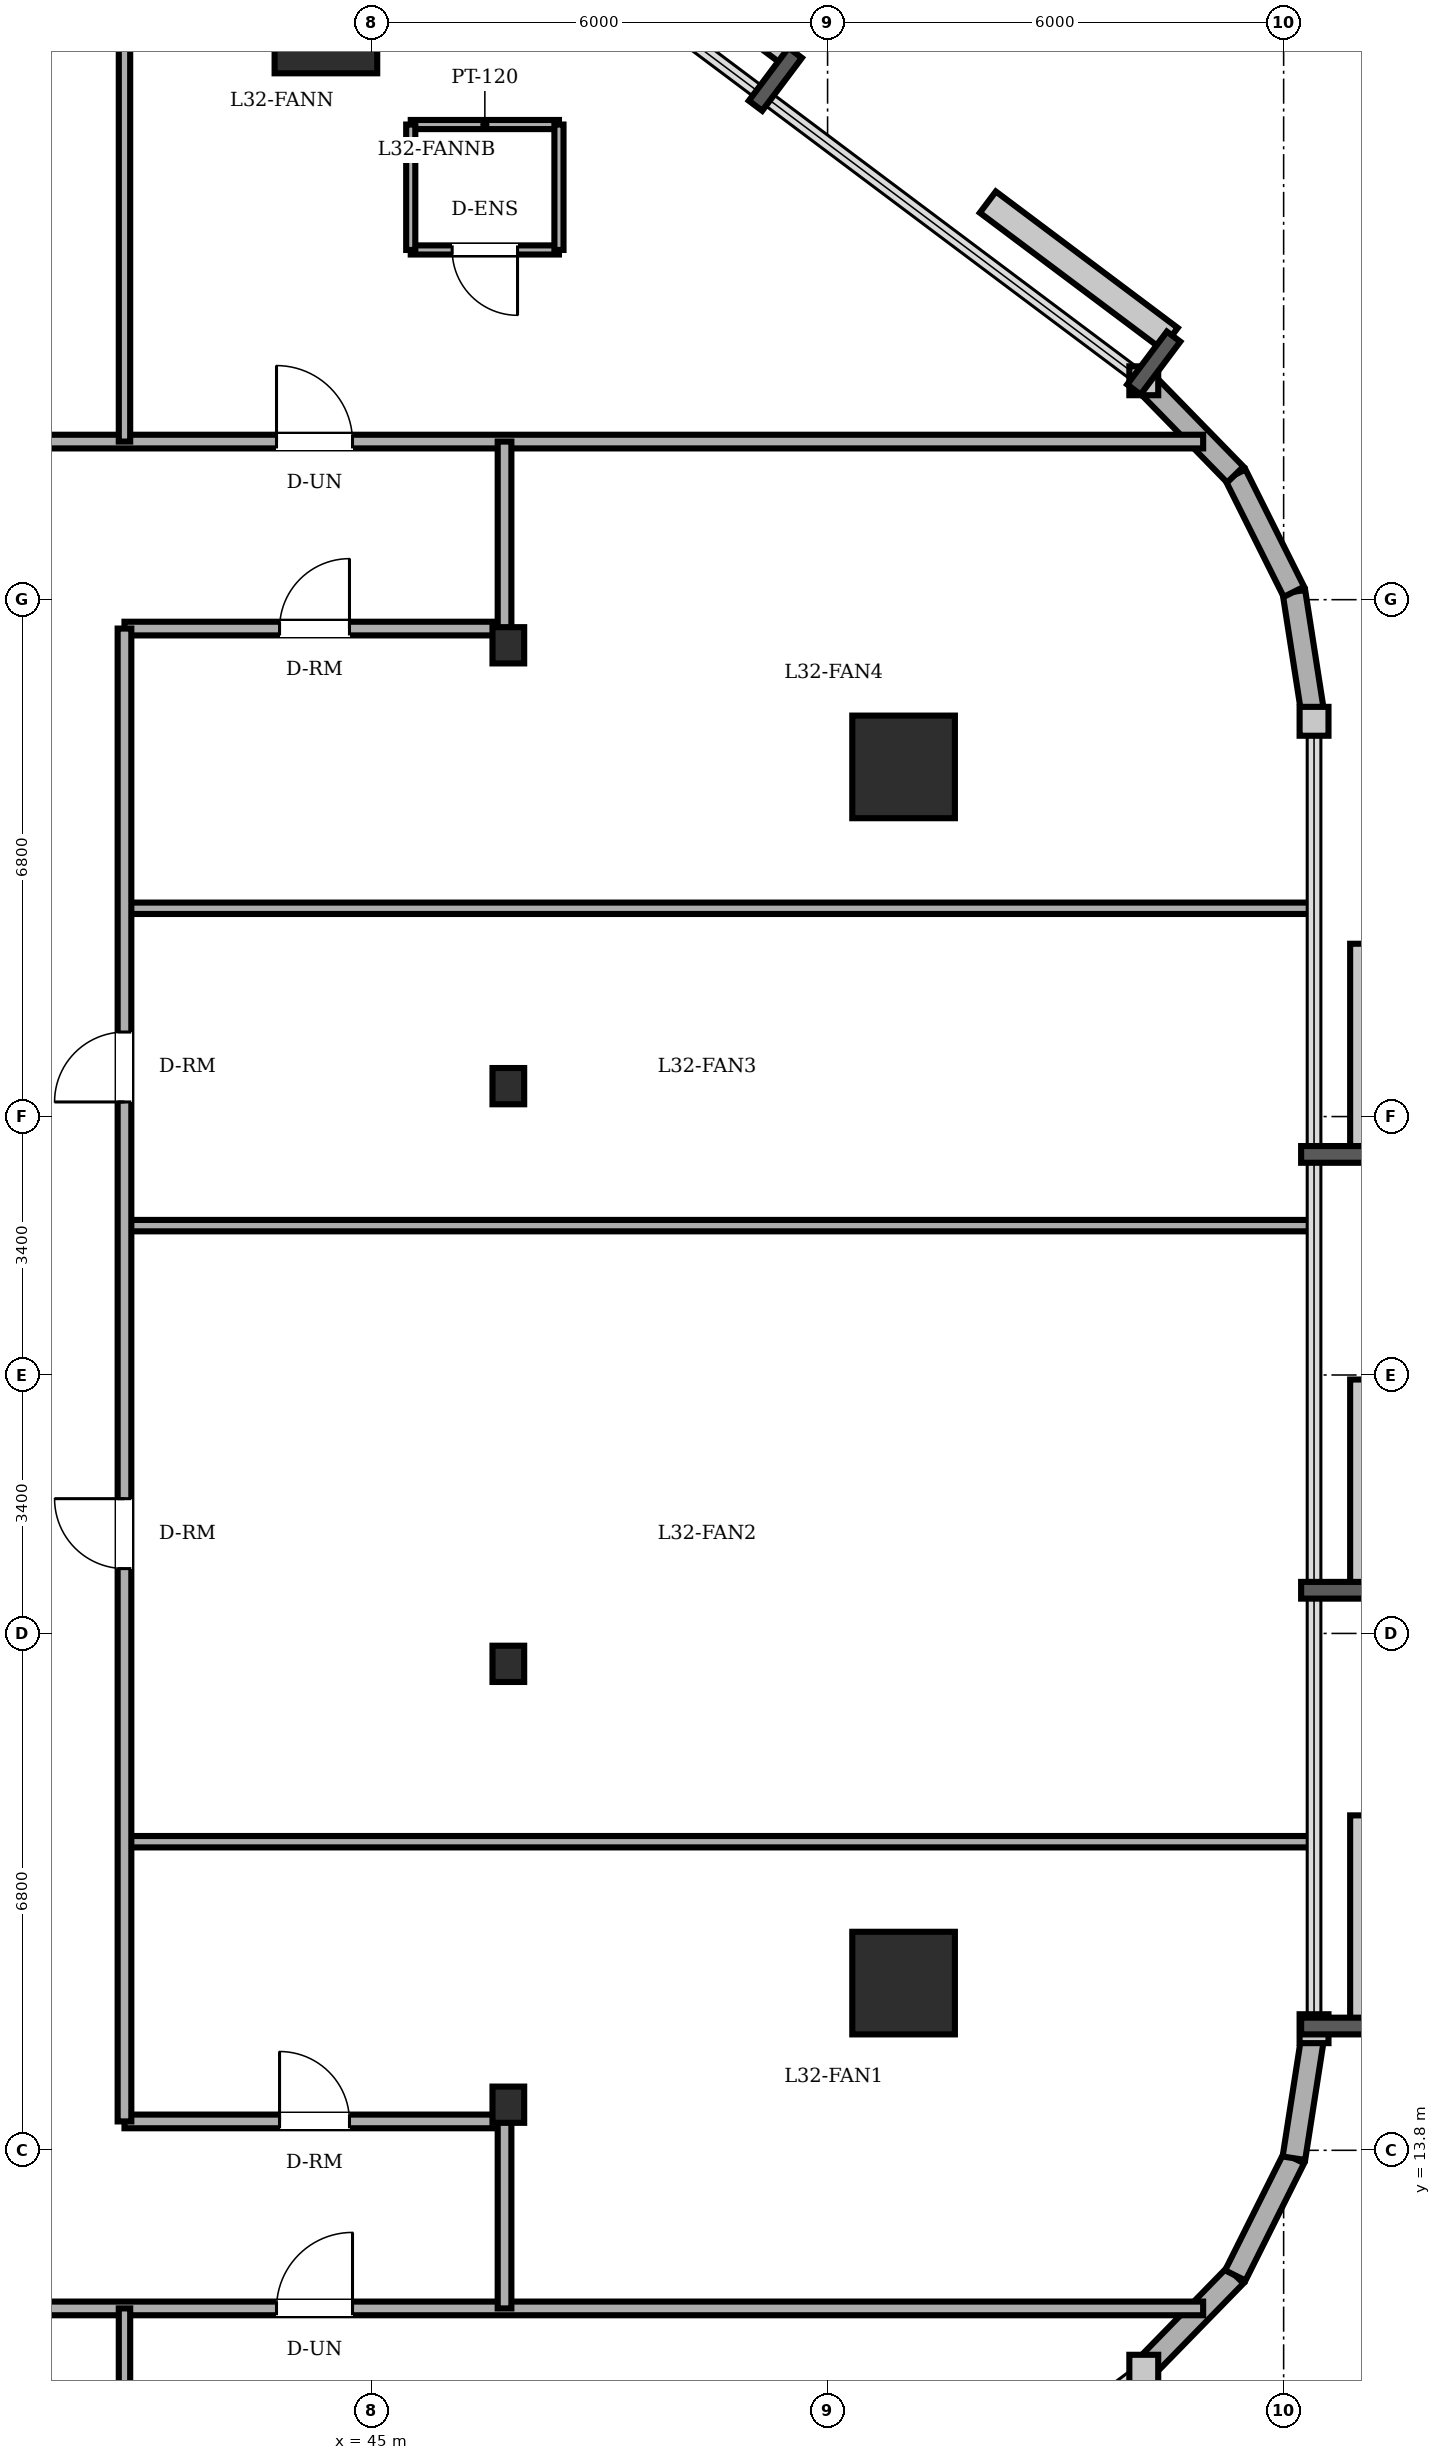
"""IFC4 building model, lengths in metres.
Left out: names, types, materials, properties, quantities, classifications, styles, units other than length and angle.
Written with IfcOpenShell. Run it as: python <this file> out.ifc"""

import sys

from ifc_helpers import new_model, si_unit, direction, frame, frame_2d, origin, origin_2d, place, context, subcontext, project, spatial, rectangle, circle, i_section, extrude, element, fill, save


model = new_model("IFC4")
c1 = context("Model", 3, precision=1e-05, world=origin(), true_north=direction((0.0, 1.0)))
c2 = subcontext(c1, "Body", "Model", "MODEL_VIEW")
j1 = project(units=[si_unit("LENGTHUNIT", "METRE"), si_unit("PLANEANGLEUNIT", "RADIAN")], contexts=[c1])
p1 = place(None, origin())
s1 = spatial("IfcSite", under=j1, at=p1, CompositionType="ELEMENT")
p2 = place(p1, origin())
s2 = spatial("IfcBuilding", under=s1, at=p2, CompositionType="ELEMENT")
p3 = place(p2, frame((0.0, 0.0, 122.3)))
s3 = spatial("IfcBuildingStorey", under=s2, at=p3, CompositionType="ELEMENT", Elevation=122.3)
for number, where, z_axis, x_axis in (
    (1, (52.0, 16.0, 0.0), (0.0, 0.0, 1.0), (1.0, 0.0, 0.0)),
    (2, (52.0, 32.0, 0.0), (0.0, 0.0, 1.0), (1.0, 0.0, 0.0)),
    (3, (44.4, 41.8, 0.0), (0.0, 0.0, 1.0), (1.0, 0.0, 0.0)),
):
    element("IfcColumn", number, at=place(p3, frame(where, z_axis=z_axis, x_axis=x_axis)), inside=s3, PredefinedType="COLUMN", context=c2, shape_type="SweptSolid", body=[
        extrude(circle(Radius=0.675, at=origin_2d()), origin(), (0.0, 0.0, 1.0), 3.6),
    ])
for number, where, z_axis, x_axis in (
    (4, (46.8, 14.4, 0.0), (0.0, 0.0, 1.0), (1.0, 0.0, 0.0)),
    (5, (46.8, 20.2, 0.0), (0.0, 0.0, 1.0), (1.0, 0.0, 0.0)),
    (6, (46.8, 27.8, 0.0), (0.0, 0.0, 1.0), (1.0, 0.0, 0.0)),
    (7, (46.8, 33.6, 0.0), (0.0, 0.0, 1.0), (1.0, 0.0, 0.0)),
):
    element("IfcColumn", number, at=place(p3, frame(where, z_axis=z_axis, x_axis=x_axis)), inside=s3, PredefinedType="COLUMN", context=c2, shape_type="SweptSolid", body=[
        extrude(i_section(OverallWidth=0.417, OverallDepth=0.477, WebThickness=0.036, FlangeThickness=0.057, FilletRadius=0.015, at=origin_2d()), origin(), (0.0, 0.0, 1.0), 3.6),
    ])
for number, where, z_axis, x_axis in (
    (8, (55.16, 10.92, 0.0), (0.0, 0.0, 1.0), (0.698, 0.716, 0.0)),
    (9, (56.364, 12.154, 0.0), (0.0, 0.0, 1.0), (0.447, 0.894, 0.0)),
):
    element("IfcWall", number, at=place(p3, frame(where, z_axis=z_axis, x_axis=x_axis)), inside=s3, PredefinedType="SOLIDWALL", context=c2, shape_type="SweptSolid", body=[
        extrude(rectangle(XDim=1.724, YDim=0.3, at=frame_2d((0.862, 0.0))), origin(), (0.0, 0.0, 1.0), 3.4),
    ])
for number, where, z_axis, x_axis in (
    (10, (57.135, 13.696, 0.0), (0.0, 0.0, 1.0), (0.154, 0.988, 0.0)),
    (11, (57.4, 32.6, 0.0), (0.0, 0.0, 1.0), (-0.154, 0.988, 0.0)),
):
    element("IfcWall", number, at=place(p3, frame(where, z_axis=z_axis, x_axis=x_axis)), inside=s3, PredefinedType="SOLIDWALL", context=c2, shape_type="SweptSolid", body=[
        extrude(rectangle(XDim=1.724, YDim=0.3, at=frame_2d((0.862, 0.0))), origin(), (0.0, 0.0, 1.0), 3.4),
    ])
for number, where, z_axis, x_axis in (
    (12, (57.135, 34.304, 0.0), (0.0, 0.0, 1.0), (-0.447, 0.894, 0.0)),
    (13, (56.364, 35.846, 0.0), (0.0, 0.0, 1.0), (-0.698, 0.716, 0.0)),
):
    element("IfcWall", number, at=place(p3, frame(where, z_axis=z_axis, x_axis=x_axis)), inside=s3, PredefinedType="SOLIDWALL", context=c2, shape_type="SweptSolid", body=[
        extrude(rectangle(XDim=1.724, YDim=0.3, at=frame_2d((0.862, 0.0))), origin(), (0.0, 0.0, 1.0), 3.4),
    ])
p4 = place(p3, frame((45.516, 40.451, 0.0), z_axis=(0.0, 0.0, 1.0), x_axis=(1.0, 0.0, 0.0)))
e14 = element("IfcWall", 14, at=p4, inside=s3, PredefinedType="PARTITIONING", context=c2, shape_type="SweptSolid", body=[
    extrude(rectangle(XDim=1.95, YDim=0.12, at=frame_2d((0.975, 0.0))), origin(), (0.0, 0.0, 1.0), 3.4),
])
p5 = place(p3, frame((47.466, 38.801, 0.0), z_axis=(0.0, 0.0, 1.0), x_axis=(-1.0, 0.0, 0.0)))
e15 = element("IfcWall", 15, at=p5, inside=s3, PredefinedType="PARTITIONING", context=c2, shape_type="SweptSolid", body=[
    extrude(rectangle(XDim=1.95, YDim=0.12, at=frame_2d((0.975, 0.0))), origin(), (0.0, 0.0, 1.0), 3.4),
])
p6 = place(p5, frame((0.545, 0.0, 0.0)))
e16 = element("IfcOpeningElement", 16, at=p6, cuts=e15, PredefinedType="OPENING", context=c2, shape_type="SweptSolid", body=[
    extrude(rectangle(XDim=0.86, YDim=2.1, at=frame_2d((0.43, 1.05))), frame((0.0, 0.07, 0.0), z_axis=(0.0, -1.0, 0.0), x_axis=(1.0, 0.0, 0.0)), (0.0, 0.0, 1.0), 0.14),
])
for number, where, z_axis, x_axis in (
    (17, (45.516, 40.451, 0.0), (0.0, 0.0, 1.0), (0.0, -1.0, 0.0)),
    (18, (47.466, 38.801, 0.0), (0.0, 0.0, 1.0), (0.0, 1.0, 0.0)),
):
    element("IfcWall", number, at=place(p3, frame(where, z_axis=z_axis, x_axis=x_axis)), inside=s3, PredefinedType="PARTITIONING", context=c2, shape_type="SweptSolid", body=[
        extrude(rectangle(XDim=1.65, YDim=0.12, at=frame_2d((0.825, 0.0))), origin(), (0.0, 0.0, 1.0), 3.4),
    ])
p7 = place(p3, frame((8.8, 11.72, 0.0), z_axis=(0.0, 0.0, 1.0), x_axis=(1.0, 0.0, 0.0)))
e19 = element("IfcWall", 19, at=p7, inside=s3, PredefinedType="PARTITIONING", context=c2, shape_type="SweptSolid", body=[
    extrude(rectangle(XDim=47.141, YDim=0.18, at=frame_2d((23.57, 0.0))), origin(), (0.0, 0.0, 1.0), 3.4),
])
p8 = place(p7, frame((17.24, 0.0, 0.0)))
e20 = element("IfcOpeningElement", 20, at=p8, cuts=e19, PredefinedType="OPENING", context=c2, shape_type="SweptSolid", body=[
    extrude(rectangle(XDim=0.92, YDim=2.1, at=frame_2d((0.46, 1.05))), frame((0.0, 0.1, 0.0), z_axis=(0.0, -1.0, 0.0), x_axis=(1.0, 0.0, 0.0)), (0.0, 0.0, 1.0), 0.2),
])
p9 = place(p7, frame((34.95, 0.0, 0.0)))
e21 = element("IfcOpeningElement", 21, at=p9, cuts=e19, PredefinedType="OPENING", context=c2, shape_type="SweptSolid", body=[
    extrude(rectangle(XDim=1.0, YDim=2.15, at=frame_2d((0.5, 1.075))), frame((0.0, 0.1, 0.0), z_axis=(0.0, -1.0, 0.0), x_axis=(1.0, 0.0, 0.0)), (0.0, 0.0, 1.0), 0.2),
])
p10 = place(p7, frame((8.04, 0.0, 0.0)))
e22 = element("IfcOpeningElement", 22, at=p10, cuts=e19, PredefinedType="OPENING", context=c2, shape_type="SweptSolid", body=[
    extrude(rectangle(XDim=0.92, YDim=2.1, at=frame_2d((0.46, 1.05))), frame((0.0, 0.1, 0.0), z_axis=(0.0, -1.0, 0.0), x_axis=(1.0, 0.0, 0.0)), (0.0, 0.0, 1.0), 0.2),
])
p11 = place(p7, frame((25.775, 0.0, 0.0)))
e23 = element("IfcOpeningElement", 23, at=p11, cuts=e19, PredefinedType="OPENING", context=c2, shape_type="SweptSolid", body=[
    extrude(rectangle(XDim=1.0, YDim=2.15, at=frame_2d((0.5, 1.075))), frame((0.0, 0.1, 0.0), z_axis=(0.0, -1.0, 0.0), x_axis=(1.0, 0.0, 0.0)), (0.0, 0.0, 1.0), 0.2),
])
p12 = place(p3, frame((41.75, 14.18, 0.0), z_axis=(0.0, 0.0, 1.0), x_axis=(1.0, 0.0, 0.0)))
e24 = element("IfcWall", 24, at=p12, inside=s3, PredefinedType="PARTITIONING", context=c2, shape_type="SweptSolid", body=[
    extrude(rectangle(XDim=5.0, YDim=0.18, at=frame_2d((2.5, 0.0))), origin(), (0.0, 0.0, 1.0), 2.882),
])
p13 = place(p12, frame((2.04, 0.0, 0.0)))
e25 = element("IfcOpeningElement", 25, at=p13, cuts=e24, PredefinedType="OPENING", context=c2, shape_type="SweptSolid", body=[
    extrude(rectangle(XDim=0.92, YDim=2.1, at=frame_2d((0.46, 1.05))), frame((0.0, 0.1, 0.0), z_axis=(0.0, -1.0, 0.0), x_axis=(1.0, 0.0, 0.0)), (0.0, 0.0, 1.0), 0.2),
])
for number, where, z_axis, x_axis in (
    (26, (41.75, 17.86, 0.0), (0.0, 0.0, 1.0), (1.0, 0.0, 0.0)),
    (27, (41.75, 25.965, 0.0), (0.0, 0.0, 1.0), (1.0, 0.0, 0.0)),
    (28, (41.75, 30.14, 0.0), (0.0, 0.0, 1.0), (1.0, 0.0, 0.0)),
):
    element("IfcWall", number, at=place(p3, frame(where, z_axis=z_axis, x_axis=x_axis)), inside=s3, PredefinedType="PARTITIONING", context=c2, shape_type="SweptSolid", body=[
        extrude(rectangle(XDim=15.65, YDim=0.15, at=frame_2d((7.825, 0.0))), origin(), (0.0, 0.0, 1.0), 3.022),
    ])
p14 = place(p3, frame((41.75, 33.82, 0.0), z_axis=(0.0, 0.0, 1.0), x_axis=(1.0, 0.0, 0.0)))
e29 = element("IfcWall", 29, at=p14, inside=s3, PredefinedType="PARTITIONING", context=c2, shape_type="SweptSolid", body=[
    extrude(rectangle(XDim=5.0, YDim=0.18, at=frame_2d((2.5, 0.0))), origin(), (0.0, 0.0, 1.0), 2.882),
])
p15 = place(p14, frame((2.04, 0.0, 0.0)))
e30 = element("IfcOpeningElement", 30, at=p15, cuts=e29, PredefinedType="OPENING", context=c2, shape_type="SweptSolid", body=[
    extrude(rectangle(XDim=0.92, YDim=2.1, at=frame_2d((0.46, 1.05))), frame((0.0, 0.1, 0.0), z_axis=(0.0, -1.0, 0.0), x_axis=(1.0, 0.0, 0.0)), (0.0, 0.0, 1.0), 0.2),
])
p16 = place(p3, frame((8.8, 36.28, 0.0), z_axis=(0.0, 0.0, 1.0), x_axis=(1.0, 0.0, 0.0)))
e31 = element("IfcWall", 31, at=p16, inside=s3, PredefinedType="PARTITIONING", context=c2, shape_type="SweptSolid", body=[
    extrude(rectangle(XDim=47.141, YDim=0.18, at=frame_2d((23.57, 0.0))), origin(), (0.0, 0.0, 1.0), 3.4),
])
p17 = place(p16, frame((17.05, 0.0, 0.0)))
e32 = element("IfcOpeningElement", 32, at=p17, cuts=e31, PredefinedType="OPENING", context=c2, shape_type="SweptSolid", body=[
    extrude(rectangle(XDim=0.9, YDim=2.1, at=frame_2d((0.45, 1.05))), frame((0.0, 0.1, 0.0), z_axis=(0.0, -1.0, 0.0), x_axis=(1.0, 0.0, 0.0)), (0.0, 0.0, 1.0), 0.2),
])
p18 = place(p16, frame((20.67, 0.0, 0.0)))
e33 = element("IfcOpeningElement", 33, at=p18, cuts=e31, PredefinedType="OPENING", context=c2, shape_type="SweptSolid", body=[
    extrude(rectangle(XDim=0.86, YDim=2.1, at=frame_2d((0.43, 1.05))), frame((0.0, 0.1, 0.0), z_axis=(0.0, -1.0, 0.0), x_axis=(1.0, 0.0, 0.0)), (0.0, 0.0, 1.0), 0.2),
])
p19 = place(p16, frame((34.95, 0.0, 0.0)))
e34 = element("IfcOpeningElement", 34, at=p19, cuts=e31, PredefinedType="OPENING", context=c2, shape_type="SweptSolid", body=[
    extrude(rectangle(XDim=1.0, YDim=2.15, at=frame_2d((0.5, 1.075))), frame((0.0, 0.1, 0.0), z_axis=(0.0, -1.0, 0.0), x_axis=(1.0, 0.0, 0.0)), (0.0, 0.0, 1.0), 0.2),
])
p20 = place(p16, frame((8.0, 0.0, 0.0)))
e35 = element("IfcOpeningElement", 35, at=p20, cuts=e31, PredefinedType="OPENING", context=c2, shape_type="SweptSolid", body=[
    extrude(rectangle(XDim=1.0, YDim=2.15, at=frame_2d((0.5, 1.075))), frame((0.0, 0.1, 0.0), z_axis=(0.0, -1.0, 0.0), x_axis=(1.0, 0.0, 0.0)), (0.0, 0.0, 1.0), 0.2),
])
p21 = place(p16, frame((27.515, 0.0, 0.0)))
e36 = element("IfcOpeningElement", 36, at=p21, cuts=e31, PredefinedType="OPENING", context=c2, shape_type="SweptSolid", body=[
    extrude(rectangle(XDim=0.92, YDim=2.1, at=frame_2d((0.46, 1.05))), frame((0.0, 0.1, 0.0), z_axis=(0.0, -1.0, 0.0), x_axis=(1.0, 0.0, 0.0)), (0.0, 0.0, 1.0), 0.2),
])
p22 = place(p3, frame((41.75, 4.2, 0.0), z_axis=(0.0, 0.0, 1.0), x_axis=(0.0, 1.0, 0.0)))
e37 = element("IfcWall", 37, at=p22, inside=s3, PredefinedType="PARTITIONING", context=c2, shape_type="SweptSolid", body=[
    extrude(rectangle(XDim=7.52, YDim=0.15, at=frame_2d((3.76, 0.0))), origin(), (0.0, 0.0, 1.0), 3.4),
])
p23 = place(p3, frame((41.75, 14.18, 0.0), z_axis=(0.0, 0.0, 1.0), x_axis=(0.0, 1.0, 0.0)))
e38 = element("IfcWall", 38, at=p23, inside=s3, PredefinedType="PARTITIONING", context=c2, shape_type="SweptSolid", body=[
    extrude(rectangle(XDim=19.64, YDim=0.18, at=frame_2d((9.82, 0.0))), origin(), (0.0, 0.0, 1.0), 3.4),
])
p24 = place(p23, frame((7.273, 0.0, 0.0)))
e39 = element("IfcOpeningElement", 39, at=p24, cuts=e38, PredefinedType="OPENING", context=c2, shape_type="SweptSolid", body=[
    extrude(rectangle(XDim=0.92, YDim=2.1, at=frame_2d((0.46, 1.05))), frame((0.0, 0.1, 0.0), z_axis=(0.0, -1.0, 0.0), x_axis=(1.0, 0.0, 0.0)), (0.0, 0.0, 1.0), 0.2),
])
p25 = place(p23, frame((13.412, 0.0, 0.0)))
e40 = element("IfcOpeningElement", 40, at=p25, cuts=e38, PredefinedType="OPENING", context=c2, shape_type="SweptSolid", body=[
    extrude(rectangle(XDim=0.92, YDim=2.1, at=frame_2d((0.46, 1.05))), frame((0.0, 0.1, 0.0), z_axis=(0.0, -1.0, 0.0), x_axis=(1.0, 0.0, 0.0)), (0.0, 0.0, 1.0), 0.2),
])
p26 = place(p3, frame((41.75, 36.28, 0.0), z_axis=(0.0, 0.0, 1.0), x_axis=(0.0, 1.0, 0.0)))
e41 = element("IfcWall", 41, at=p26, inside=s3, PredefinedType="PARTITIONING", context=c2, shape_type="SweptSolid", body=[
    extrude(rectangle(XDim=7.52, YDim=0.15, at=frame_2d((3.76, 0.0))), origin(), (0.0, 0.0, 1.0), 3.4),
])
for number, where, z_axis, x_axis in (
    (42, (46.75, 11.72, 0.0), (0.0, 0.0, 1.0), (0.0, 1.0, 0.0)),
    (43, (46.75, 33.82, 0.0), (0.0, 0.0, 1.0), (0.0, 1.0, 0.0)),
):
    element("IfcWall", number, at=place(p3, frame(where, z_axis=z_axis, x_axis=x_axis)), inside=s3, PredefinedType="PARTITIONING", context=c2, shape_type="SweptSolid", body=[
        extrude(rectangle(XDim=2.46, YDim=0.18, at=frame_2d((1.23, 0.0))), origin(), (0.0, 0.0, 1.0), 2.882),
    ])
p27 = place(p6, origin())
e44 = element("IfcDoor", 44, at=p27, inside=s3, OperationType="SINGLE_SWING_LEFT", PredefinedType="DOOR", context=c2, shape_type="SweptSolid", body=[
    extrude(rectangle(XDim=0.86, YDim=2.1, at=frame_2d((0.43, 1.05))), frame((0.0, 0.025, 0.0), z_axis=(0.0, -1.0, 0.0), x_axis=(1.0, 0.0, 0.0)), (0.0, 0.0, 1.0), 0.05),
])
fill(e16, e44)
p28 = place(p13, origin())
e45 = element("IfcDoor", 45, at=p28, inside=s3, OperationType="SINGLE_SWING_LEFT", PredefinedType="DOOR", context=c2, shape_type="SweptSolid", body=[
    extrude(rectangle(XDim=0.92, YDim=2.1, at=frame_2d((0.46, 1.05))), frame((0.0, 0.025, 0.0), z_axis=(0.0, -1.0, 0.0), x_axis=(1.0, 0.0, 0.0)), (0.0, 0.0, 1.0), 0.05),
])
fill(e25, e45)
p29 = place(p24, origin())
e46 = element("IfcDoor", 46, at=p29, inside=s3, OperationType="SINGLE_SWING_RIGHT", PredefinedType="DOOR", context=c2, shape_type="SweptSolid", body=[
    extrude(rectangle(XDim=0.92, YDim=2.1, at=frame_2d((0.46, 1.05))), frame((0.0, 0.025, 0.0), z_axis=(0.0, -1.0, 0.0), x_axis=(1.0, 0.0, 0.0)), (0.0, 0.0, 1.0), 0.05),
])
fill(e39, e46)
p30 = place(p25, origin())
e47 = element("IfcDoor", 47, at=p30, inside=s3, OperationType="SINGLE_SWING_LEFT", PredefinedType="DOOR", context=c2, shape_type="SweptSolid", body=[
    extrude(rectangle(XDim=0.92, YDim=2.1, at=frame_2d((0.46, 1.05))), frame((0.0, 0.025, 0.0), z_axis=(0.0, -1.0, 0.0), x_axis=(1.0, 0.0, 0.0)), (0.0, 0.0, 1.0), 0.05),
])
fill(e40, e47)
p31 = place(p15, origin())
e48 = element("IfcDoor", 48, at=p31, inside=s3, OperationType="SINGLE_SWING_RIGHT", PredefinedType="DOOR", context=c2, shape_type="SweptSolid", body=[
    extrude(rectangle(XDim=0.92, YDim=2.1, at=frame_2d((0.46, 1.05))), frame((0.0, 0.025, 0.0), z_axis=(0.0, -1.0, 0.0), x_axis=(1.0, 0.0, 0.0)), (0.0, 0.0, 1.0), 0.05),
])
fill(e30, e48)
p32 = place(p19, origin())
e49 = element("IfcDoor", 49, at=p32, inside=s3, OperationType="SINGLE_SWING_LEFT", PredefinedType="DOOR", context=c2, shape_type="SweptSolid", body=[
    extrude(rectangle(XDim=1.0, YDim=2.15, at=frame_2d((0.5, 1.075))), frame((0.0, 0.025, 0.0), z_axis=(0.0, -1.0, 0.0), x_axis=(1.0, 0.0, 0.0)), (0.0, 0.0, 1.0), 0.05),
])
fill(e34, e49)
p33 = place(p9, origin())
e50 = element("IfcDoor", 50, at=p33, inside=s3, OperationType="SINGLE_SWING_RIGHT", PredefinedType="DOOR", context=c2, shape_type="SweptSolid", body=[
    extrude(rectangle(XDim=1.0, YDim=2.15, at=frame_2d((0.5, 1.075))), frame((0.0, 0.025, 0.0), z_axis=(0.0, -1.0, 0.0), x_axis=(1.0, 0.0, 0.0)), (0.0, 0.0, 1.0), 0.05),
])
fill(e21, e50)
save(model, sys.argv[1])
